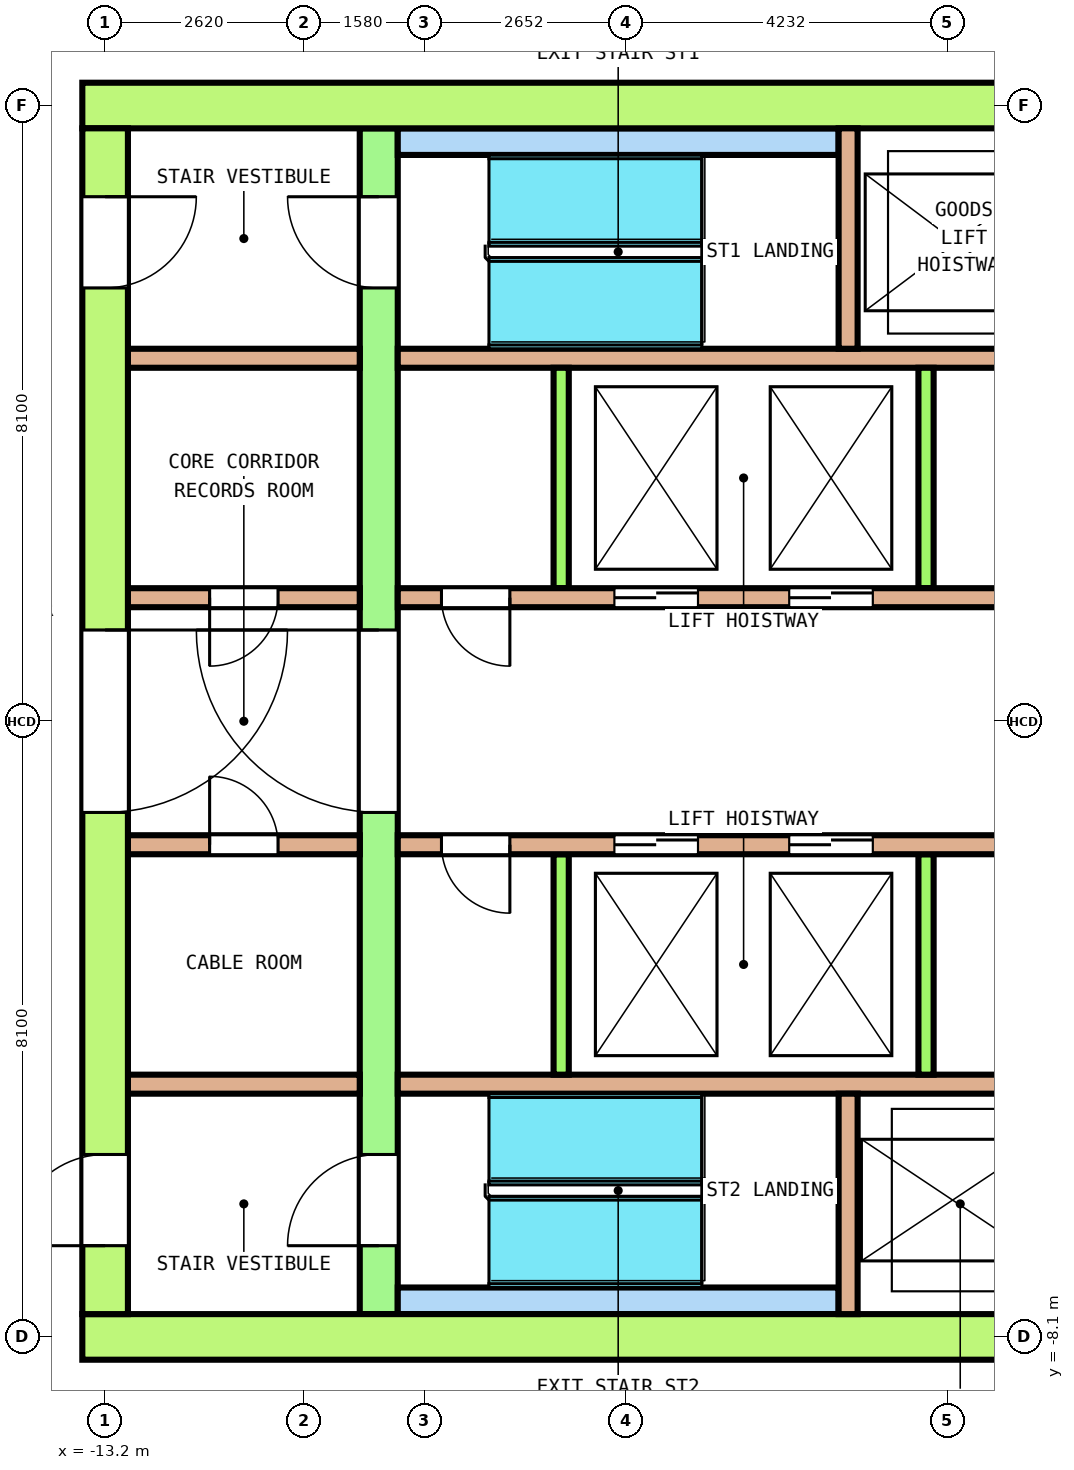
"""IFC4 building model, lengths in metres.
Left out: names, types, materials, properties, quantities, classifications, styles, units other than length and angle.
Written with IfcOpenShell. Run it as: python <this file> out.ifc"""

import sys

from ifc_helpers import new_model, si_unit, direction, frame, frame_2d, origin, place, context, subcontext, project, spatial, rectangle, extrude, element, fill, save


model = new_model("IFC4")
c1 = context("Model", 3, precision=1e-05, world=origin(), true_north=direction((0.0, 1.0)))
c2 = subcontext(c1, "Body", "Model", "MODEL_VIEW")
j1 = project(units=[si_unit("LENGTHUNIT", "METRE"), si_unit("PLANEANGLEUNIT", "RADIAN")], contexts=[c1])
p1 = place(None, origin())
s1 = spatial("IfcSite", under=j1, at=p1, CompositionType="ELEMENT")
p2 = place(p1, origin())
s2 = spatial("IfcBuilding", under=s1, at=p2, CompositionType="ELEMENT")
p3 = place(p2, frame((0.0, 0.0, 215.4)))
s3 = spatial("IfcBuildingStorey", under=s2, at=p3, CompositionType="ELEMENT", Elevation=215.4)
p4 = place(p3, frame((-13.5, 8.1, 0.0), z_axis=(0.0, 0.0, 1.0), x_axis=(1.0, 0.0, 0.0)))
e1 = element("IfcWall", 1, at=p4, inside=s3, PredefinedType="SHEAR", context=c2, shape_type="SweptSolid", body=[
    extrude(rectangle(XDim=27.0, YDim=0.6, at=frame_2d((13.5, 0.0))), origin(), (0.0, 0.0, 1.0), 3.7),
])
p5 = place(p4, frame((14.425, 0.0, 0.0)))
e2 = element("IfcOpeningElement", 2, at=p5, cuts=e1, PredefinedType="OPENING", context=c2, shape_type="SweptSolid", body=[
    extrude(rectangle(XDim=1.4, YDim=2.1, at=frame_2d((0.7, 1.05))), frame((0.0, 0.31, 0.0), z_axis=(0.0, -1.0, 0.0), x_axis=(1.0, 0.0, 0.0)), (0.0, 0.0, 1.0), 0.62),
])
p6 = place(p3, frame((-13.5, -8.1, 0.0), z_axis=(0.0, 0.0, 1.0), x_axis=(1.0, 0.0, 0.0)))
e3 = element("IfcWall", 3, at=p6, inside=s3, PredefinedType="SHEAR", context=c2, shape_type="SweptSolid", body=[
    extrude(rectangle(XDim=27.0, YDim=0.6, at=frame_2d((13.5, 0.0))), origin(), (0.0, 0.0, 1.0), 3.7),
])
p7 = place(p6, frame((15.05, 0.0, 0.0)))
e4 = element("IfcOpeningElement", 4, at=p7, cuts=e3, PredefinedType="OPENING", context=c2, shape_type="SweptSolid", body=[
    extrude(rectangle(XDim=1.2, YDim=2.1, at=frame_2d((0.6, 1.05))), frame((0.0, 0.31, 0.0), z_axis=(0.0, -1.0, 0.0), x_axis=(1.0, 0.0, 0.0)), (0.0, 0.0, 1.0), 0.62),
])
p8 = place(p3, frame((-13.2, -7.8, 0.0), z_axis=(0.0, 0.0, 1.0), x_axis=(0.0, 1.0, 0.0)))
e5 = element("IfcWall", 5, at=p8, inside=s3, PredefinedType="SHEAR", context=c2, shape_type="SweptSolid", body=[
    extrude(rectangle(XDim=15.6, YDim=0.6, at=frame_2d((7.8, 0.0))), origin(), (0.0, 0.0, 1.0), 3.7),
])
p9 = place(p8, frame((6.6, 0.0, 0.0)))
e6 = element("IfcOpeningElement", 6, at=p9, cuts=e5, PredefinedType="OPENING", context=c2, shape_type="SweptSolid", body=[
    extrude(rectangle(XDim=2.4, YDim=2.1, at=frame_2d((1.2, 1.05))), frame((0.0, 0.31, 0.0), z_axis=(0.0, -1.0, 0.0), x_axis=(1.0, 0.0, 0.0)), (0.0, 0.0, 1.0), 0.62),
])
p10 = place(p8, frame((13.5, 0.0, 0.0)))
e7 = element("IfcOpeningElement", 7, at=p10, cuts=e5, PredefinedType="OPENING", context=c2, shape_type="SweptSolid", body=[
    extrude(rectangle(XDim=1.2, YDim=2.1, at=frame_2d((0.6, 1.05))), frame((0.0, 0.31, 0.0), z_axis=(0.0, -1.0, 0.0), x_axis=(1.0, 0.0, 0.0)), (0.0, 0.0, 1.0), 0.62),
])
p11 = place(p8, frame((0.9, 0.0, 0.0)))
e8 = element("IfcOpeningElement", 8, at=p11, cuts=e5, PredefinedType="OPENING", context=c2, shape_type="SweptSolid", body=[
    extrude(rectangle(XDim=1.2, YDim=2.1, at=frame_2d((0.6, 1.05))), frame((0.0, 0.31, 0.0), z_axis=(0.0, -1.0, 0.0), x_axis=(1.0, 0.0, 0.0)), (0.0, 0.0, 1.0), 0.62),
])
p12 = place(p3, frame((-9.6, -7.8, 0.0), z_axis=(0.0, 0.0, 1.0), x_axis=(0.0, 1.0, 0.0)))
e9 = element("IfcWall", 9, at=p12, inside=s3, PredefinedType="SHEAR", context=c2, shape_type="SweptSolid", body=[
    extrude(rectangle(XDim=15.6, YDim=0.5, at=frame_2d((7.8, 0.0))), origin(), (0.0, 0.0, 1.0), 3.7),
])
p13 = place(p12, frame((6.6, 0.0, 0.0)))
e10 = element("IfcOpeningElement", 10, at=p13, cuts=e9, PredefinedType="OPENING", context=c2, shape_type="SweptSolid", body=[
    extrude(rectangle(XDim=2.4, YDim=2.1, at=frame_2d((1.2, 1.05))), frame((0.0, 0.26, 0.0), z_axis=(0.0, -1.0, 0.0), x_axis=(1.0, 0.0, 0.0)), (0.0, 0.0, 1.0), 0.52),
])
p14 = place(p12, frame((13.5, 0.0, 0.0)))
e11 = element("IfcOpeningElement", 11, at=p14, cuts=e9, PredefinedType="OPENING", context=c2, shape_type="SweptSolid", body=[
    extrude(rectangle(XDim=1.2, YDim=2.1, at=frame_2d((0.6, 1.05))), frame((0.0, 0.26, 0.0), z_axis=(0.0, -1.0, 0.0), x_axis=(1.0, 0.0, 0.0)), (0.0, 0.0, 1.0), 0.52),
])
p15 = place(p12, frame((0.9, 0.0, 0.0)))
e12 = element("IfcOpeningElement", 12, at=p15, cuts=e9, PredefinedType="OPENING", context=c2, shape_type="SweptSolid", body=[
    extrude(rectangle(XDim=1.2, YDim=2.1, at=frame_2d((0.6, 1.05))), frame((0.0, 0.26, 0.0), z_axis=(0.0, -1.0, 0.0), x_axis=(1.0, 0.0, 0.0)), (0.0, 0.0, 1.0), 0.52),
])
p16 = place(p3, frame((-12.9, 1.625, 0.0), z_axis=(0.0, 0.0, 1.0), x_axis=(1.0, 0.0, 0.0)))
e13 = element("IfcWall", 13, at=p16, inside=s3, PredefinedType="SOLIDWALL", context=c2, shape_type="SweptSolid", body=[
    extrude(rectangle(XDim=3.05, YDim=0.25, at=frame_2d((1.525, 0.0))), origin(), (0.0, 0.0, 1.0), 3.7),
])
p17 = place(p16, frame((1.075, 0.0, 0.0)))
e14 = element("IfcOpeningElement", 14, at=p17, cuts=e13, PredefinedType="OPENING", context=c2, shape_type="SweptSolid", body=[
    extrude(rectangle(XDim=0.9, YDim=2.1, at=frame_2d((0.45, 1.05))), frame((0.0, 0.135, 0.0), z_axis=(0.0, -1.0, 0.0), x_axis=(1.0, 0.0, 0.0)), (0.0, 0.0, 1.0), 0.27),
])
p18 = place(p3, frame((-9.35, 1.625, 0.0), z_axis=(0.0, 0.0, 1.0), x_axis=(1.0, 0.0, 0.0)))
e15 = element("IfcWall", 15, at=p18, inside=s3, PredefinedType="SOLIDWALL", context=c2, shape_type="SweptSolid", body=[
    extrude(rectangle(XDim=18.7, YDim=0.25, at=frame_2d((9.35, 0.0))), origin(), (0.0, 0.0, 1.0), 3.7),
])
p19 = place(p18, frame((2.85, 0.0, 0.0)))
e16 = element("IfcOpeningElement", 16, at=p19, cuts=e15, PredefinedType="OPENING", context=c2, shape_type="SweptSolid", body=[
    extrude(rectangle(XDim=1.1, YDim=2.1, at=frame_2d((0.55, 1.05))), frame((0.0, 0.135, 0.0), z_axis=(0.0, -1.0, 0.0), x_axis=(1.0, 0.0, 0.0)), (0.0, 0.0, 1.0), 0.27),
])
p20 = place(p18, frame((5.15, 0.0, 0.0)))
e17 = element("IfcOpeningElement", 17, at=p20, cuts=e15, PredefinedType="OPENING", context=c2, shape_type="SweptSolid", body=[
    extrude(rectangle(XDim=1.1, YDim=2.1, at=frame_2d((0.55, 1.05))), frame((0.0, 0.135, 0.0), z_axis=(0.0, -1.0, 0.0), x_axis=(1.0, 0.0, 0.0)), (0.0, 0.0, 1.0), 0.27),
])
p21 = place(p18, frame((14.8, 0.0, 0.0)))
e18 = element("IfcOpeningElement", 18, at=p21, cuts=e15, PredefinedType="OPENING", context=c2, shape_type="SweptSolid", body=[
    extrude(rectangle(XDim=1.1, YDim=2.1, at=frame_2d((0.55, 1.05))), frame((0.0, 0.135, 0.0), z_axis=(0.0, -1.0, 0.0), x_axis=(1.0, 0.0, 0.0)), (0.0, 0.0, 1.0), 0.27),
])
p22 = place(p18, frame((0.575, 0.0, 0.0)))
e19 = element("IfcOpeningElement", 19, at=p22, cuts=e15, PredefinedType="OPENING", context=c2, shape_type="SweptSolid", body=[
    extrude(rectangle(XDim=0.9, YDim=2.1, at=frame_2d((0.45, 1.05))), frame((0.0, 0.135, 0.0), z_axis=(0.0, -1.0, 0.0), x_axis=(1.0, 0.0, 0.0)), (0.0, 0.0, 1.0), 0.27),
])
p23 = place(p18, frame((17.225, 0.0, 0.0)))
e20 = element("IfcOpeningElement", 20, at=p23, cuts=e15, PredefinedType="OPENING", context=c2, shape_type="SweptSolid", body=[
    extrude(rectangle(XDim=0.9, YDim=2.1, at=frame_2d((0.45, 1.05))), frame((0.0, 0.135, 0.0), z_axis=(0.0, -1.0, 0.0), x_axis=(1.0, 0.0, 0.0)), (0.0, 0.0, 1.0), 0.27),
])
p24 = place(p3, frame((-12.9, 4.775, 0.0), z_axis=(0.0, 0.0, 1.0), x_axis=(1.0, 0.0, 0.0)))
e21 = element("IfcWall", 21, at=p24, inside=s3, PredefinedType="SOLIDWALL", context=c2, shape_type="SweptSolid", body=[
    extrude(rectangle(XDim=3.05, YDim=0.25, at=frame_2d((1.525, 0.0))), origin(), (0.0, 0.0, 1.0), 3.7),
])
p25 = place(p3, frame((-9.35, 4.775, 0.0), z_axis=(0.0, 0.0, 1.0), x_axis=(1.0, 0.0, 0.0)))
e22 = element("IfcWall", 22, at=p25, inside=s3, PredefinedType="SOLIDWALL", context=c2, shape_type="SweptSolid", body=[
    extrude(rectangle(XDim=18.7, YDim=0.25, at=frame_2d((9.35, 0.0))), origin(), (0.0, 0.0, 1.0), 3.7),
])
for number, where, z_axis, x_axis in (
    (23, (-7.2, 1.75, 0.0), (0.0, 0.0, 1.0), (0.0, 1.0, 0.0)),
    (24, (-2.4, 1.75, 0.0), (0.0, 0.0, 1.0), (0.0, 1.0, 0.0)),
):
    element("IfcWall", number, at=place(p3, frame(where, z_axis=z_axis, x_axis=x_axis)), inside=s3, PredefinedType="SOLIDWALL", context=c2, shape_type="SweptSolid", body=[
        extrude(rectangle(XDim=2.9, YDim=0.2, at=frame_2d((1.45, 0.0))), origin(), (0.0, 0.0, 1.0), 3.7),
    ])
p26 = place(p3, frame((-12.9, -1.625, 0.0), z_axis=(0.0, 0.0, 1.0), x_axis=(1.0, 0.0, 0.0)))
e25 = element("IfcWall", 25, at=p26, inside=s3, PredefinedType="SOLIDWALL", context=c2, shape_type="SweptSolid", body=[
    extrude(rectangle(XDim=3.05, YDim=0.25, at=frame_2d((1.525, 0.0))), origin(), (0.0, 0.0, 1.0), 3.7),
])
p27 = place(p26, frame((1.075, 0.0, 0.0)))
e26 = element("IfcOpeningElement", 26, at=p27, cuts=e25, PredefinedType="OPENING", context=c2, shape_type="SweptSolid", body=[
    extrude(rectangle(XDim=0.9, YDim=2.1, at=frame_2d((0.45, 1.05))), frame((0.0, 0.135, 0.0), z_axis=(0.0, -1.0, 0.0), x_axis=(1.0, 0.0, 0.0)), (0.0, 0.0, 1.0), 0.27),
])
p28 = place(p3, frame((-9.35, -1.625, 0.0), z_axis=(0.0, 0.0, 1.0), x_axis=(1.0, 0.0, 0.0)))
e27 = element("IfcWall", 27, at=p28, inside=s3, PredefinedType="SOLIDWALL", context=c2, shape_type="SweptSolid", body=[
    extrude(rectangle(XDim=18.7, YDim=0.25, at=frame_2d((9.35, 0.0))), origin(), (0.0, 0.0, 1.0), 3.7),
])
p29 = place(p28, frame((2.85, 0.0, 0.0)))
e28 = element("IfcOpeningElement", 28, at=p29, cuts=e27, PredefinedType="OPENING", context=c2, shape_type="SweptSolid", body=[
    extrude(rectangle(XDim=1.1, YDim=2.1, at=frame_2d((0.55, 1.05))), frame((0.0, 0.135, 0.0), z_axis=(0.0, -1.0, 0.0), x_axis=(1.0, 0.0, 0.0)), (0.0, 0.0, 1.0), 0.27),
])
p30 = place(p28, frame((5.15, 0.0, 0.0)))
e29 = element("IfcOpeningElement", 29, at=p30, cuts=e27, PredefinedType="OPENING", context=c2, shape_type="SweptSolid", body=[
    extrude(rectangle(XDim=1.1, YDim=2.1, at=frame_2d((0.55, 1.05))), frame((0.0, 0.135, 0.0), z_axis=(0.0, -1.0, 0.0), x_axis=(1.0, 0.0, 0.0)), (0.0, 0.0, 1.0), 0.27),
])
p31 = place(p28, frame((14.8, 0.0, 0.0)))
e30 = element("IfcOpeningElement", 30, at=p31, cuts=e27, PredefinedType="OPENING", context=c2, shape_type="SweptSolid", body=[
    extrude(rectangle(XDim=1.1, YDim=2.1, at=frame_2d((0.55, 1.05))), frame((0.0, 0.135, 0.0), z_axis=(0.0, -1.0, 0.0), x_axis=(1.0, 0.0, 0.0)), (0.0, 0.0, 1.0), 0.27),
])
p32 = place(p28, frame((0.575, 0.0, 0.0)))
e31 = element("IfcOpeningElement", 31, at=p32, cuts=e27, PredefinedType="OPENING", context=c2, shape_type="SweptSolid", body=[
    extrude(rectangle(XDim=0.9, YDim=2.1, at=frame_2d((0.45, 1.05))), frame((0.0, 0.135, 0.0), z_axis=(0.0, -1.0, 0.0), x_axis=(1.0, 0.0, 0.0)), (0.0, 0.0, 1.0), 0.27),
])
p33 = place(p28, frame((17.225, 0.0, 0.0)))
e32 = element("IfcOpeningElement", 32, at=p33, cuts=e27, PredefinedType="OPENING", context=c2, shape_type="SweptSolid", body=[
    extrude(rectangle(XDim=0.9, YDim=2.1, at=frame_2d((0.45, 1.05))), frame((0.0, 0.135, 0.0), z_axis=(0.0, -1.0, 0.0), x_axis=(1.0, 0.0, 0.0)), (0.0, 0.0, 1.0), 0.27),
])
p34 = place(p3, frame((-12.9, -4.775, 0.0), z_axis=(0.0, 0.0, 1.0), x_axis=(1.0, 0.0, 0.0)))
e33 = element("IfcWall", 33, at=p34, inside=s3, PredefinedType="SOLIDWALL", context=c2, shape_type="SweptSolid", body=[
    extrude(rectangle(XDim=3.05, YDim=0.25, at=frame_2d((1.525, 0.0))), origin(), (0.0, 0.0, 1.0), 3.7),
])
p35 = place(p3, frame((-9.35, -4.775, 0.0), z_axis=(0.0, 0.0, 1.0), x_axis=(1.0, 0.0, 0.0)))
e34 = element("IfcWall", 34, at=p35, inside=s3, PredefinedType="SOLIDWALL", context=c2, shape_type="SweptSolid", body=[
    extrude(rectangle(XDim=18.7, YDim=0.25, at=frame_2d((9.35, 0.0))), origin(), (0.0, 0.0, 1.0), 3.7),
])
for number, where, z_axis, x_axis in (
    (35, (-7.2, -4.65, 0.0), (0.0, 0.0, 1.0), (0.0, 1.0, 0.0)),
    (36, (-2.4, -4.65, 0.0), (0.0, 0.0, 1.0), (0.0, 1.0, 0.0)),
):
    element("IfcWall", number, at=place(p3, frame(where, z_axis=z_axis, x_axis=x_axis)), inside=s3, PredefinedType="SOLIDWALL", context=c2, shape_type="SweptSolid", body=[
        extrude(rectangle(XDim=2.9, YDim=0.2, at=frame_2d((1.45, 0.0))), origin(), (0.0, 0.0, 1.0), 3.7),
    ])
p36 = place(p3, frame((-9.35, 7.625, 0.0), z_axis=(0.0, 0.0, 1.0), x_axis=(1.0, 0.0, 0.0)))
e37 = element("IfcWall", 37, at=p36, inside=s3, PredefinedType="SOLIDWALL", context=c2, shape_type="SweptSolid", body=[
    extrude(rectangle(XDim=5.8, YDim=0.35, at=frame_2d((2.9, 0.0))), origin(), (0.0, 0.0, 1.0), 3.7),
])
p37 = place(p3, frame((-3.425, 4.9, 0.0), z_axis=(0.0, 0.0, 1.0), x_axis=(0.0, 1.0, 0.0)))
e38 = element("IfcWall", 38, at=p37, inside=s3, PredefinedType="SOLIDWALL", context=c2, shape_type="SweptSolid", body=[
    extrude(rectangle(XDim=2.9, YDim=0.25, at=frame_2d((1.45, 0.0))), origin(), (0.0, 0.0, 1.0), 3.7),
])
p38 = place(p3, frame((-9.35, -7.625, 0.0), z_axis=(0.0, 0.0, 1.0), x_axis=(1.0, 0.0, 0.0)))
e39 = element("IfcWall", 39, at=p38, inside=s3, PredefinedType="SOLIDWALL", context=c2, shape_type="SweptSolid", body=[
    extrude(rectangle(XDim=5.8, YDim=0.35, at=frame_2d((2.9, 0.0))), origin(), (0.0, 0.0, 1.0), 3.7),
])
p39 = place(p3, frame((-3.425, -7.8, 0.0), z_axis=(0.0, 0.0, 1.0), x_axis=(0.0, 1.0, 0.0)))
e40 = element("IfcWall", 40, at=p39, inside=s3, PredefinedType="SOLIDWALL", context=c2, shape_type="SweptSolid", body=[
    extrude(rectangle(XDim=2.9, YDim=0.25, at=frame_2d((1.45, 0.0))), origin(), (0.0, 0.0, 1.0), 3.7),
])
p40 = place(p19, origin())
e41 = element("IfcDoor", 41, at=p40, inside=s3, OperationType="DOUBLE_DOOR_SLIDING", PredefinedType="DOOR", context=c2, shape_type="SweptSolid", body=[
    extrude(rectangle(XDim=1.1, YDim=2.1, at=frame_2d((0.55, 1.05))), frame((0.0, 0.075, 0.0), z_axis=(0.0, -1.0, 0.0), x_axis=(1.0, 0.0, 0.0)), (0.0, 0.0, 1.0), 0.15),
])
fill(e16, e41)
p41 = place(p20, origin())
e42 = element("IfcDoor", 42, at=p41, inside=s3, OperationType="DOUBLE_DOOR_SLIDING", PredefinedType="DOOR", context=c2, shape_type="SweptSolid", body=[
    extrude(rectangle(XDim=1.1, YDim=2.1, at=frame_2d((0.55, 1.05))), frame((0.0, 0.075, 0.0), z_axis=(0.0, -1.0, 0.0), x_axis=(1.0, 0.0, 0.0)), (0.0, 0.0, 1.0), 0.15),
])
fill(e17, e42)
p42 = place(p29, origin())
e43 = element("IfcDoor", 43, at=p42, inside=s3, OperationType="DOUBLE_DOOR_SLIDING", PredefinedType="DOOR", context=c2, shape_type="SweptSolid", body=[
    extrude(rectangle(XDim=1.1, YDim=2.1, at=frame_2d((0.55, 1.05))), frame((0.0, 0.075, 0.0), z_axis=(0.0, -1.0, 0.0), x_axis=(1.0, 0.0, 0.0)), (0.0, 0.0, 1.0), 0.15),
])
fill(e28, e43)
p43 = place(p30, origin())
e44 = element("IfcDoor", 44, at=p43, inside=s3, OperationType="DOUBLE_DOOR_SLIDING", PredefinedType="DOOR", context=c2, shape_type="SweptSolid", body=[
    extrude(rectangle(XDim=1.1, YDim=2.1, at=frame_2d((0.55, 1.05))), frame((0.0, 0.075, 0.0), z_axis=(0.0, -1.0, 0.0), x_axis=(1.0, 0.0, 0.0)), (0.0, 0.0, 1.0), 0.15),
])
fill(e29, e44)
p44 = place(p13, origin())
e45 = element("IfcDoor", 45, at=p44, inside=s3, OperationType="DOUBLE_DOOR_SINGLE_SWING", PredefinedType="DOOR", context=c2, shape_type="SweptSolid", body=[
    extrude(rectangle(XDim=2.4, YDim=2.1, at=frame_2d((1.2, 1.05))), frame((0.0, 0.2, 0.0), z_axis=(0.0, -1.0, 0.0), x_axis=(1.0, 0.0, 0.0)), (0.0, 0.0, 1.0), 0.4),
])
fill(e10, e45)
p45 = place(p9, origin())
e46 = element("IfcDoor", 46, at=p45, inside=s3, OperationType="DOUBLE_DOOR_SINGLE_SWING", PredefinedType="DOOR", context=c2, shape_type="SweptSolid", body=[
    extrude(rectangle(XDim=2.4, YDim=2.1, at=frame_2d((1.2, 1.05))), frame((0.0, 0.25, 0.0), z_axis=(0.0, -1.0, 0.0), x_axis=(1.0, 0.0, 0.0)), (0.0, 0.0, 1.0), 0.5),
])
fill(e6, e46)
p46 = place(p14, origin())
e47 = element("IfcDoor", 47, at=p46, inside=s3, OperationType="SINGLE_SWING_RIGHT", PredefinedType="DOOR", context=c2, shape_type="SweptSolid", body=[
    extrude(rectangle(XDim=1.2, YDim=2.1, at=frame_2d((0.6, 1.05))), frame((0.0, 0.2, 0.0), z_axis=(0.0, -1.0, 0.0), x_axis=(1.0, 0.0, 0.0)), (0.0, 0.0, 1.0), 0.4),
])
fill(e11, e47)
p47 = place(p10, origin())
e48 = element("IfcDoor", 48, at=p47, inside=s3, OperationType="SINGLE_SWING_LEFT", PredefinedType="DOOR", context=c2, shape_type="SweptSolid", body=[
    extrude(rectangle(XDim=1.2, YDim=2.1, at=frame_2d((0.6, 1.05))), frame((0.0, 0.25, 0.0), z_axis=(0.0, -1.0, 0.0), x_axis=(1.0, 0.0, 0.0)), (0.0, 0.0, 1.0), 0.5),
])
fill(e7, e48)
p48 = place(p15, origin())
e49 = element("IfcDoor", 49, at=p48, inside=s3, OperationType="SINGLE_SWING_RIGHT", PredefinedType="DOOR", context=c2, shape_type="SweptSolid", body=[
    extrude(rectangle(XDim=1.2, YDim=2.1, at=frame_2d((0.6, 1.05))), frame((0.0, 0.2, 0.0), z_axis=(0.0, -1.0, 0.0), x_axis=(1.0, 0.0, 0.0)), (0.0, 0.0, 1.0), 0.4),
])
fill(e12, e49)
p49 = place(p11, origin())
e50 = element("IfcDoor", 50, at=p49, inside=s3, OperationType="SINGLE_SWING_LEFT", PredefinedType="DOOR", context=c2, shape_type="SweptSolid", body=[
    extrude(rectangle(XDim=1.2, YDim=2.1, at=frame_2d((0.6, 1.05))), frame((0.0, 0.25, 0.0), z_axis=(0.0, -1.0, 0.0), x_axis=(1.0, 0.0, 0.0)), (0.0, 0.0, 1.0), 0.5),
])
fill(e8, e50)
p50 = place(p17, origin())
e51 = element("IfcDoor", 51, at=p50, inside=s3, OperationType="SINGLE_SWING_RIGHT", PredefinedType="DOOR", context=c2, shape_type="SweptSolid", body=[
    extrude(rectangle(XDim=0.9, YDim=2.1, at=frame_2d((0.45, 1.05))), frame((0.0, 0.075, 0.0), z_axis=(0.0, -1.0, 0.0), x_axis=(1.0, 0.0, 0.0)), (0.0, 0.0, 1.0), 0.15),
])
fill(e14, e51)
p51 = place(p22, origin())
e52 = element("IfcDoor", 52, at=p51, inside=s3, OperationType="SINGLE_SWING_LEFT", PredefinedType="DOOR", context=c2, shape_type="SweptSolid", body=[
    extrude(rectangle(XDim=0.9, YDim=2.1, at=frame_2d((0.45, 1.05))), frame((0.0, 0.075, 0.0), z_axis=(0.0, -1.0, 0.0), x_axis=(1.0, 0.0, 0.0)), (0.0, 0.0, 1.0), 0.15),
])
fill(e19, e52)
p52 = place(p27, origin())
e53 = element("IfcDoor", 53, at=p52, inside=s3, OperationType="SINGLE_SWING_RIGHT", PredefinedType="DOOR", context=c2, shape_type="SweptSolid", body=[
    extrude(rectangle(XDim=0.9, YDim=2.1, at=frame_2d((0.45, 1.05))), frame((0.0, 0.075, 0.0), z_axis=(0.0, -1.0, 0.0), x_axis=(1.0, 0.0, 0.0)), (0.0, 0.0, 1.0), 0.15),
])
fill(e26, e53)
p53 = place(p32, origin())
e54 = element("IfcDoor", 54, at=p53, inside=s3, OperationType="SINGLE_SWING_LEFT", PredefinedType="DOOR", context=c2, shape_type="SweptSolid", body=[
    extrude(rectangle(XDim=0.9, YDim=2.1, at=frame_2d((0.45, 1.05))), frame((0.0, 0.075, 0.0), z_axis=(0.0, -1.0, 0.0), x_axis=(1.0, 0.0, 0.0)), (0.0, 0.0, 1.0), 0.15),
])
fill(e31, e54)
save(model, sys.argv[1])
